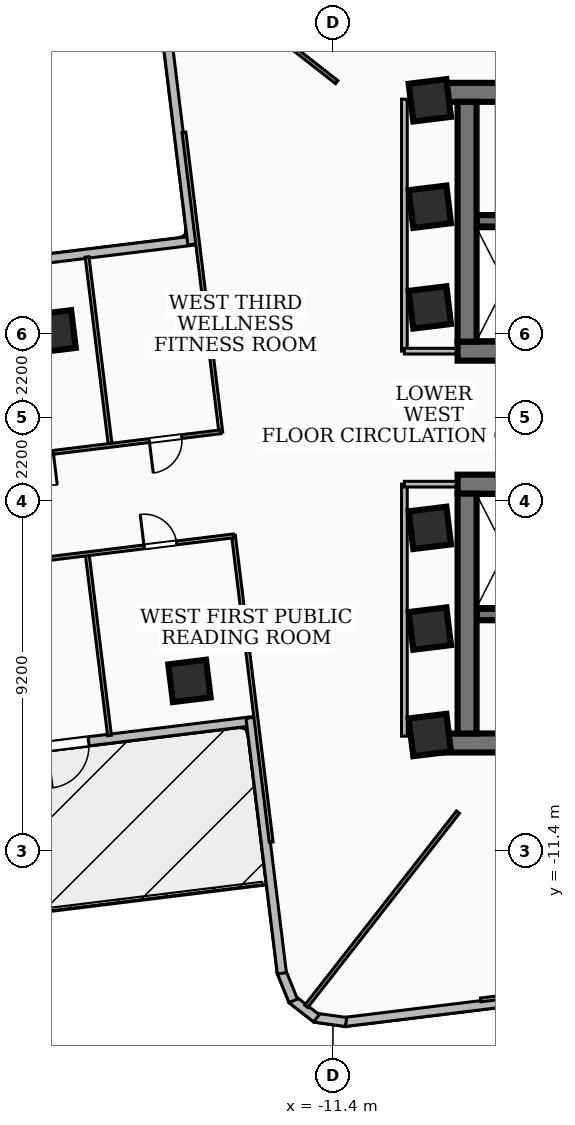
"""IFC4 building model, lengths in metres.
Left out: names, types, materials, properties, quantities, classifications, styles, units other than length and angle.
Written with IfcOpenShell. Run it as: python <this file> out.ifc"""

import sys

from ifc_helpers import new_model, si_unit, direction, frame, frame_2d, origin, origin_2d, place, context, subcontext, project, spatial, rectangle, extrude, element, fill, save


model = new_model("IFC4")
c1 = context("Model", 3, precision=1e-05, world=origin(), true_north=direction((0.0, 1.0)))
c2 = subcontext(c1, "Body", "Model", "MODEL_VIEW")
j1 = project(units=[si_unit("LENGTHUNIT", "METRE"), si_unit("PLANEANGLEUNIT", "RADIAN")], contexts=[c1])
p1 = place(None, origin())
s1 = spatial("IfcSite", under=j1, at=p1, CompositionType="ELEMENT")
p2 = place(p1, origin())
s2 = spatial("IfcBuilding", under=s1, at=p2, CompositionType="ELEMENT")
p3 = place(p2, frame((0.0, 0.0, 82.08)))
s3 = spatial("IfcBuildingStorey", under=s2, at=p3, CompositionType="ELEMENT", Elevation=82.08)
p4 = place(p3, frame((-8.78, 8.56, 0.0), z_axis=(0.0, 0.0, 1.0), x_axis=(1.0, 0.0, 0.0)))
e1 = element("IfcWall", 1, at=p4, inside=s3, PredefinedType="SHEAR", context=c2, shape_type="SweptSolid", body=[
    extrude(rectangle(XDim=17.56, YDim=0.5, at=frame_2d((8.78, 0.0))), origin(), (0.0, 0.0, 1.0), 3.34),
])
p5 = place(p3, frame((8.12, 1.75, 0.0), z_axis=(0.0, 0.0, 1.0), x_axis=(-1.0, 0.0, 0.0)))
e2 = element("IfcWall", 2, at=p5, inside=s3, PredefinedType="SHEAR", context=c2, shape_type="SweptSolid", body=[
    extrude(rectangle(XDim=16.24, YDim=0.5, at=frame_2d((8.12, 0.0))), origin(), (0.0, 0.0, 1.0), 3.34),
])
p6 = place(p5, frame((7.45, 0.0, 0.0)))
e3 = element("IfcOpeningElement", 3, at=p6, cuts=e2, PredefinedType="OPENING", context=c2, shape_type="SweptSolid", body=[
    extrude(rectangle(XDim=1.0, YDim=2.1, at=frame_2d((0.5, 1.05))), frame((0.0, 0.26, 0.0), z_axis=(0.0, -1.0, 0.0), x_axis=(1.0, 0.0, 0.0)), (0.0, 0.0, 1.0), 0.52),
])
p7 = place(p5, frame((3.85, 0.0, 0.0)))
e4 = element("IfcOpeningElement", 4, at=p7, cuts=e2, PredefinedType="OPENING", context=c2, shape_type="SweptSolid", body=[
    extrude(rectangle(XDim=0.9, YDim=2.06, at=frame_2d((0.45, 1.03))), frame((0.0, 0.26, 0.0), z_axis=(0.0, -1.0, 0.0), x_axis=(1.0, 0.0, 0.0)), (0.0, 0.0, 1.0), 0.52),
])
p8 = place(p5, frame((2.35, 0.0, 0.0)))
e5 = element("IfcOpeningElement", 5, at=p8, cuts=e2, PredefinedType="OPENING", context=c2, shape_type="SweptSolid", body=[
    extrude(rectangle(XDim=0.9, YDim=2.06, at=frame_2d((0.45, 1.03))), frame((0.0, 0.26, 0.0), z_axis=(0.0, -1.0, 0.0), x_axis=(1.0, 0.0, 0.0)), (0.0, 0.0, 1.0), 0.52),
])
p9 = place(p5, frame((0.8, 0.0, 0.0)))
e6 = element("IfcOpeningElement", 6, at=p9, cuts=e2, PredefinedType="OPENING", context=c2, shape_type="SweptSolid", body=[
    extrude(rectangle(XDim=0.9, YDim=2.06, at=frame_2d((0.45, 1.03))), frame((0.0, 0.26, 0.0), z_axis=(0.0, -1.0, 0.0), x_axis=(1.0, 0.0, 0.0)), (0.0, 0.0, 1.0), 0.52),
])
p10 = place(p3, frame((-7.87, 2.0, 0.0), z_axis=(0.0, 0.0, 1.0), x_axis=(0.0, 1.0, 0.0)))
e7 = element("IfcWall", 7, at=p10, inside=s3, PredefinedType="SHEAR", context=c2, shape_type="SweptSolid", body=[
    extrude(rectangle(XDim=6.31, YDim=0.5, at=frame_2d((3.155, 0.0))), origin(), (0.0, 0.0, 1.0), 3.34),
])
p11 = place(p3, frame((7.62, 5.18, 0.0), z_axis=(0.0, 0.0, 1.0), x_axis=(-1.0, 0.0, 0.0)))
e8 = element("IfcWall", 8, at=p11, inside=s3, PredefinedType="SOLIDWALL", context=c2, shape_type="SweptSolid", body=[
    extrude(rectangle(XDim=15.24, YDim=0.3, at=frame_2d((7.62, 0.0))), origin(), (0.0, 0.0, 1.0), 3.34),
])
p12 = place(p11, frame((5.77, 0.0, 0.0)))
e9 = element("IfcOpeningElement", 9, at=p12, cuts=e8, PredefinedType="OPENING", context=c2, shape_type="SweptSolid", body=[
    extrude(rectangle(XDim=1.1, YDim=2.15, at=frame_2d((0.55, 1.075))), frame((0.0, 0.16, 0.0), z_axis=(0.0, -1.0, 0.0), x_axis=(1.0, 0.0, 0.0)), (0.0, 0.0, 1.0), 0.32),
])
p13 = place(p11, frame((2.97, 0.0, 0.0)))
e10 = element("IfcOpeningElement", 10, at=p13, cuts=e8, PredefinedType="OPENING", context=c2, shape_type="SweptSolid", body=[
    extrude(rectangle(XDim=1.1, YDim=2.15, at=frame_2d((0.55, 1.075))), frame((0.0, 0.16, 0.0), z_axis=(0.0, -1.0, 0.0), x_axis=(1.0, 0.0, 0.0)), (0.0, 0.0, 1.0), 0.32),
])
p14 = place(p11, frame((7.97, 0.0, 0.0)))
e11 = element("IfcOpeningElement", 11, at=p14, cuts=e8, PredefinedType="OPENING", context=c2, shape_type="SweptSolid", body=[
    extrude(rectangle(XDim=1.0, YDim=2.1, at=frame_2d((0.5, 1.05))), frame((0.0, 0.16, 0.0), z_axis=(0.0, -1.0, 0.0), x_axis=(1.0, 0.0, 0.0)), (0.0, 0.0, 1.0), 0.32),
])
p15 = place(p3, frame((8.78, -8.56, 0.0), z_axis=(0.0, 0.0, 1.0), x_axis=(-1.0, 0.0, 0.0)))
e12 = element("IfcWall", 12, at=p15, inside=s3, PredefinedType="SHEAR", context=c2, shape_type="SweptSolid", body=[
    extrude(rectangle(XDim=17.56, YDim=0.5, at=frame_2d((8.78, 0.0))), origin(), (0.0, 0.0, 1.0), 3.34),
])
p16 = place(p3, frame((-8.12, -1.75, 0.0), z_axis=(0.0, 0.0, 1.0), x_axis=(1.0, 0.0, 0.0)))
e13 = element("IfcWall", 13, at=p16, inside=s3, PredefinedType="SHEAR", context=c2, shape_type="SweptSolid", body=[
    extrude(rectangle(XDim=16.24, YDim=0.5, at=frame_2d((8.12, 0.0))), origin(), (0.0, 0.0, 1.0), 3.34),
])
p17 = place(p16, frame((7.45, 0.0, 0.0)))
e14 = element("IfcOpeningElement", 14, at=p17, cuts=e13, PredefinedType="OPENING", context=c2, shape_type="SweptSolid", body=[
    extrude(rectangle(XDim=1.0, YDim=2.1, at=frame_2d((0.5, 1.05))), frame((0.0, 0.26, 0.0), z_axis=(0.0, -1.0, 0.0), x_axis=(1.0, 0.0, 0.0)), (0.0, 0.0, 1.0), 0.52),
])
p18 = place(p16, frame((10.965, 0.0, 0.0)))
e15 = element("IfcOpeningElement", 15, at=p18, cuts=e13, PredefinedType="OPENING", context=c2, shape_type="SweptSolid", body=[
    extrude(rectangle(XDim=1.05, YDim=2.15, at=frame_2d((0.525, 1.075))), frame((0.0, 0.26, 0.0), z_axis=(0.0, -1.0, 0.0), x_axis=(1.0, 0.0, 0.0)), (0.0, 0.0, 1.0), 0.52),
])
p19 = place(p16, frame((12.525, 0.0, 0.0)))
e16 = element("IfcOpeningElement", 16, at=p19, cuts=e13, PredefinedType="OPENING", context=c2, shape_type="SweptSolid", body=[
    extrude(rectangle(XDim=1.05, YDim=2.15, at=frame_2d((0.525, 1.075))), frame((0.0, 0.26, 0.0), z_axis=(0.0, -1.0, 0.0), x_axis=(1.0, 0.0, 0.0)), (0.0, 0.0, 1.0), 0.52),
])
p20 = place(p16, frame((14.085, 0.0, 0.0)))
e17 = element("IfcOpeningElement", 17, at=p20, cuts=e13, PredefinedType="OPENING", context=c2, shape_type="SweptSolid", body=[
    extrude(rectangle(XDim=1.05, YDim=2.15, at=frame_2d((0.525, 1.075))), frame((0.0, 0.26, 0.0), z_axis=(0.0, -1.0, 0.0), x_axis=(1.0, 0.0, 0.0)), (0.0, 0.0, 1.0), 0.52),
])
p21 = place(p3, frame((-7.87, -8.31, 0.0), z_axis=(0.0, 0.0, 1.0), x_axis=(0.0, 1.0, 0.0)))
e18 = element("IfcWall", 18, at=p21, inside=s3, PredefinedType="SHEAR", context=c2, shape_type="SweptSolid", body=[
    extrude(rectangle(XDim=6.31, YDim=0.5, at=frame_2d((3.155, 0.0))), origin(), (0.0, 0.0, 1.0), 3.34),
])
p22 = place(p3, frame((-7.62, -5.18, 0.0), z_axis=(0.0, 0.0, 1.0), x_axis=(1.0, 0.0, 0.0)))
e19 = element("IfcWall", 19, at=p22, inside=s3, PredefinedType="SOLIDWALL", context=c2, shape_type="SweptSolid", body=[
    extrude(rectangle(XDim=15.24, YDim=0.3, at=frame_2d((7.62, 0.0))), origin(), (0.0, 0.0, 1.0), 3.34),
])
p23 = place(p22, frame((5.77, 0.0, 0.0)))
e20 = element("IfcOpeningElement", 20, at=p23, cuts=e19, PredefinedType="OPENING", context=c2, shape_type="SweptSolid", body=[
    extrude(rectangle(XDim=1.1, YDim=2.15, at=frame_2d((0.55, 1.075))), frame((0.0, 0.16, 0.0), z_axis=(0.0, -1.0, 0.0), x_axis=(1.0, 0.0, 0.0)), (0.0, 0.0, 1.0), 0.32),
])
p24 = place(p22, frame((7.97, 0.0, 0.0)))
e21 = element("IfcOpeningElement", 21, at=p24, cuts=e19, PredefinedType="OPENING", context=c2, shape_type="SweptSolid", body=[
    extrude(rectangle(XDim=1.0, YDim=2.1, at=frame_2d((0.5, 1.05))), frame((0.0, 0.16, 0.0), z_axis=(0.0, -1.0, 0.0), x_axis=(1.0, 0.0, 0.0)), (0.0, 0.0, 1.0), 0.32),
])
for number, where, z_axis, x_axis in (
    (22, (-8.85, -5.55, 0.0), (0.0, 0.0, 1.0), (0.993, 0.122, 0.0)),
    (23, (-8.85, -2.9, 0.0), (0.0, 0.0, 1.0), (0.993, 0.122, 0.0)),
    (24, (-8.85, 2.9, 0.0), (0.0, 0.0, 1.0), (0.993, 0.122, 0.0)),
    (25, (-8.85, 5.55, 0.0), (0.0, 0.0, 1.0), (0.993, 0.122, 0.0)),
    (26, (-8.85, 8.35, 0.0), (0.0, 0.0, 1.0), (0.993, 0.122, 0.0)),
    (27, (-8.85, -8.35, 0.0), (0.0, 0.0, 1.0), (0.993, 0.122, 0.0)),
    (28, (-18.724, 2.271, 0.0), (0.0, 0.0, 1.0), (0.993, 0.122, 0.0)),
    (29, (-15.175, -6.927, 0.0), (0.0, 0.0, 1.0), (0.993, 0.122, 0.0)),
):
    element("IfcColumn", number, at=place(p3, frame(where, z_axis=z_axis, x_axis=x_axis)), inside=s3, PredefinedType="COLUMN", context=c2, shape_type="SweptSolid", body=[
        extrude(rectangle(XDim=1.0, YDim=1.0, at=origin_2d()), origin(), (0.0, 0.0, 1.0), 3.6),
    ])
p25 = place(p3, frame((-13.462, -7.98, 0.0), z_axis=(0.0, 0.0, 1.0), x_axis=(-0.992550299081, -0.121835560463, 0.0)))
e30 = element("IfcWall", 30, at=p25, inside=s3, PredefinedType="SOLIDWALL", context=c2, shape_type="SweptSolid", body=[
    extrude(rectangle(XDim=16.275, YDim=0.24, at=frame_2d((8.138, 0.0))), origin(), (0.0, 0.0, 1.0), 3.34),
])
p26 = place(p25, frame((4.4, 0.0, 0.0)))
e31 = element("IfcOpeningElement", 31, at=p26, cuts=e30, PredefinedType="OPENING", context=c2, shape_type="SweptSolid", body=[
    extrude(rectangle(XDim=1.1, YDim=2.1, at=frame_2d((0.55, 1.05))), frame((0.0, 0.13, 0.0), z_axis=(0.0, -1.0, 0.0), x_axis=(1.0, 0.0, 0.0)), (0.0, 0.0, 1.0), 0.26),
])
p27 = place(p3, frame((-31.169, 2.682, 0.0), z_axis=(0.0, 0.0, 1.0), x_axis=(0.992548484973, 0.121850338438, 0.0)))
e32 = element("IfcWall", 32, at=p27, inside=s3, PredefinedType="SOLIDWALL", context=c2, shape_type="SweptSolid", body=[
    extrude(rectangle(XDim=16.275, YDim=0.24, at=frame_2d((8.138, 0.0))), origin(), (0.0, 0.0, 1.0), 3.34),
])
p28 = place(p27, frame((1.1, 0.0, 0.85)))
e33 = element("IfcOpeningElement", 33, at=p28, cuts=e32, PredefinedType="OPENING", context=c2, shape_type="SweptSolid", body=[
    extrude(rectangle(XDim=2.1, YDim=2.0, at=frame_2d((1.05, 1.0))), frame((0.0, 0.13, 0.0), z_axis=(0.0, -1.0, 0.0), x_axis=(1.0, 0.0, 0.0)), (0.0, 0.0, 1.0), 0.26),
])
p29 = place(p3, frame((-15.098, 4.558, 0.0), z_axis=(0.0, 0.0, 1.0), x_axis=(-0.121938646341, 0.992537639855, 0.0)))
e34 = element("IfcWall", 34, at=p29, inside=s3, PredefinedType="SOLIDWALL", context=c2, shape_type="SweptSolid", body=[
    extrude(rectangle(XDim=6.595, YDim=0.24, at=frame_2d((3.298, 0.0))), origin(), (0.0, 0.0, 1.0), 3.34),
])
p30 = place(p3, frame((-4.558, -15.098, 0.0), z_axis=(0.0, 0.0, 1.0), x_axis=(-0.992537639855, -0.121938646341, 0.0)))
e35 = element("IfcWall", 35, at=p30, inside=s3, PredefinedType="SOLIDWALL", context=c2, shape_type="SweptSolid", body=[
    extrude(rectangle(XDim=6.595, YDim=0.24, at=frame_2d((3.298, 0.0))), origin(), (0.0, 0.0, 1.0), 2.486),
])
p31 = place(p3, frame((-11.054, -15.902, 0.0), z_axis=(0.0, 0.0, 1.0), x_axis=(-0.990379629694, 0.138376981782, 0.0)))
e36 = element("IfcWall", 36, at=p31, inside=s3, PredefinedType="SOLIDWALL", context=c2, shape_type="SweptSolid", body=[
    extrude(rectangle(XDim=0.831, YDim=0.24, at=frame_2d((0.416, 0.0))), origin(), (0.0, 0.0, 1.0), 3.34),
])
p32 = place(p3, frame((-11.832, -15.805, 0.0), z_axis=(0.0, 0.0, 1.0), x_axis=(-0.788996702001, 0.614397431824, 0.0)))
e37 = element("IfcWall", 37, at=p32, inside=s3, PredefinedType="SOLIDWALL", context=c2, shape_type="SweptSolid", body=[
    extrude(rectangle(XDim=0.814, YDim=0.24, at=frame_2d((0.407, 0.0))), origin(), (0.0, 0.0, 1.0), 3.34),
])
p33 = place(p3, frame((-12.445, -15.343, 0.0), z_axis=(0.0, 0.0, 1.0), x_axis=(-0.37326634174, 0.927724225254, 0.0)))
e38 = element("IfcWall", 38, at=p33, inside=s3, PredefinedType="SOLIDWALL", context=c2, shape_type="SweptSolid", body=[
    extrude(rectangle(XDim=0.83, YDim=0.24, at=frame_2d((0.415, 0.0))), origin(), (0.0, 0.0, 1.0), 3.34),
])
p34 = place(p3, frame((-12.743, -14.621, 0.0), z_axis=(0.0, 0.0, 1.0), x_axis=(-0.121949848087, 0.992536263595, 0.0)))
e39 = element("IfcWall", 39, at=p34, inside=s3, PredefinedType="SOLIDWALL", context=c2, shape_type="SweptSolid", body=[
    extrude(rectangle(XDim=6.775, YDim=0.24, at=frame_2d((3.387, 0.0))), origin(), (0.0, 0.0, 1.0), 3.34),
])
p35 = place(p3, frame((-9.52, 1.75, 0.0), z_axis=(0.0, 0.0, 1.0), x_axis=(0.0, 1.0, 0.0)))
e40 = element("IfcWall", 40, at=p35, inside=s3, PredefinedType="PARTITIONING", context=c2, shape_type="SweptSolid", body=[
    extrude(rectangle(XDim=6.63, YDim=0.15, at=frame_2d((3.315, 0.0))), origin(), (0.0, 0.0, 1.0), 2.486),
])
p36 = place(p3, frame((-7.85, 1.75, 0.0), z_axis=(0.0, 0.0, 1.0), x_axis=(-1.0, 0.0, 0.0)))
e41 = element("IfcWall", 41, at=p36, inside=s3, PredefinedType="PARTITIONING", context=c2, shape_type="SweptSolid", body=[
    extrude(rectangle(XDim=1.67, YDim=0.15, at=frame_2d((0.835, 0.0))), origin(), (0.0, 0.0, 1.0), 2.405),
])
p37 = place(p3, frame((-9.52, -8.38, 0.0), z_axis=(0.0, 0.0, 1.0), x_axis=(0.0, 1.0, 0.0)))
e42 = element("IfcWall", 42, at=p37, inside=s3, PredefinedType="PARTITIONING", context=c2, shape_type="SweptSolid", body=[
    extrude(rectangle(XDim=6.63, YDim=0.15, at=frame_2d((3.315, 0.0))), origin(), (0.0, 0.0, 1.0), 2.486),
])
p38 = place(p3, frame((-7.85, -1.75, 0.0), z_axis=(0.0, 0.0, 1.0), x_axis=(-1.0, 0.0, 0.0)))
e43 = element("IfcWall", 43, at=p38, inside=s3, PredefinedType="PARTITIONING", context=c2, shape_type="SweptSolid", body=[
    extrude(rectangle(XDim=1.67, YDim=0.15, at=frame_2d((0.835, 0.0))), origin(), (0.0, 0.0, 1.0), 2.405),
])
p39 = place(p3, frame((-11.3, 8.829, 0.0), z_axis=(0.0, 0.0, 1.0), x_axis=(-0.788014623364, 0.61565652223, 0.0)))
e44 = element("IfcWall", 44, at=p39, inside=s3, PredefinedType="PARTITIONING", context=c2, shape_type="SweptSolid", body=[
    extrude(rectangle(XDim=5.315, YDim=0.1, at=frame_2d((2.657, 0.0))), origin(), (0.0, 0.0, 1.0), 3.34),
])
p40 = place(p3, frame((-8.11, -10.38, 0.0), z_axis=(0.0, 0.0, 1.0), x_axis=(-0.615665236773, -0.788007814828, 0.0)))
e45 = element("IfcWall", 45, at=p40, inside=s3, PredefinedType="PARTITIONING", context=c2, shape_type="SweptSolid", body=[
    extrude(rectangle(XDim=6.482, YDim=0.1, at=frame_2d((3.241, 0.0))), origin(), (0.0, 0.0, 1.0), 3.34),
])
p41 = place(p3, frame((-14.017, -3.101, 0.0), z_axis=(0.0, 0.0, 1.0), x_axis=(0.122045971517, -0.992524448483, 0.0)))
e46 = element("IfcWall", 46, at=p41, inside=s3, PredefinedType="PARTITIONING", context=c2, shape_type="SweptSolid", body=[
    extrude(rectangle(XDim=8.13, YDim=0.1, at=frame_2d((4.065, 0.0))), origin(), (0.0, 0.0, 1.0), 2.486),
])
p42 = place(p3, frame((-15.32, 7.509, 0.0), z_axis=(0.0, 0.0, 1.0), x_axis=(0.122001160868, -0.992529957607, 0.0)))
e47 = element("IfcWall", 47, at=p42, inside=s3, PredefinedType="PARTITIONING", context=c2, shape_type="SweptSolid", body=[
    extrude(rectangle(XDim=7.95, YDim=0.1, at=frame_2d((3.975, 0.0))), origin(), (0.0, 0.0, 1.0), 2.486),
])
p43 = place(p3, frame((-17.864, -3.604, 0.0), z_axis=(0.0, 0.0, 1.0), x_axis=(0.121997782455, -0.992530372873, 0.0)))
e48 = element("IfcWall", 48, at=p43, inside=s3, PredefinedType="PARTITIONING", context=c2, shape_type="SweptSolid", body=[
    extrude(rectangle(XDim=4.795, YDim=0.1, at=frame_2d((2.397, 0.0))), origin(), (0.0, 0.0, 1.0), 2.486),
])
p44 = place(p3, frame((-17.869, 4.229, 0.0), z_axis=(0.0, 0.0, 1.0), x_axis=(0.121993075508, -0.992530951421, 0.0)))
e49 = element("IfcWall", 49, at=p44, inside=s3, PredefinedType="PARTITIONING", context=c2, shape_type="SweptSolid", body=[
    extrude(rectangle(XDim=4.975, YDim=0.1, at=frame_2d((2.488, 0.0))), origin(), (0.0, 0.0, 1.0), 2.486),
])
p45 = place(p3, frame((-20.775, -3.941, 0.0), z_axis=(0.0, 0.0, 1.0), x_axis=(0.992549540745, 0.121841738199, 0.0)))
e50 = element("IfcWall", 50, at=p45, inside=s3, PredefinedType="PARTITIONING", context=c2, shape_type="SweptSolid", body=[
    extrude(rectangle(XDim=6.811, YDim=0.1, at=frame_2d((3.405, 0.0))), origin(), (0.0, 0.0, 1.0), 3.34),
])
p46 = place(p45, frame((4.441, 0.0, 0.0)))
e51 = element("IfcOpeningElement", 51, at=p46, cuts=e50, PredefinedType="OPENING", context=c2, shape_type="SweptSolid", body=[
    extrude(rectangle(XDim=0.86, YDim=2.04, at=frame_2d((0.43, 1.02))), frame((0.0, 0.06, 0.0), z_axis=(0.0, -1.0, 0.0), x_axis=(1.0, 0.0, 0.0)), (0.0, 0.0, 1.0), 0.12),
])
p47 = place(p45, frame((1.036, 0.0, 0.0)))
e52 = element("IfcOpeningElement", 52, at=p47, cuts=e50, PredefinedType="OPENING", context=c2, shape_type="SweptSolid", body=[
    extrude(rectangle(XDim=0.86, YDim=2.04, at=frame_2d((0.43, 1.02))), frame((0.0, 0.06, 0.0), z_axis=(0.0, -1.0, 0.0), x_axis=(1.0, 0.0, 0.0)), (0.0, 0.0, 1.0), 0.12),
])
p48 = place(p3, frame((-14.352, -0.372, 0.0), z_axis=(0.0, 0.0, 1.0), x_axis=(-0.992547411675, -0.121859080812, 0.0)))
e53 = element("IfcWall", 53, at=p48, inside=s3, PredefinedType="PARTITIONING", context=c2, shape_type="SweptSolid", body=[
    extrude(rectangle(XDim=6.81, YDim=0.1, at=frame_2d((3.405, 0.0))), origin(), (0.0, 0.0, 1.0), 3.34),
])
p49 = place(p48, frame((1.035, 0.0, 0.0)))
e54 = element("IfcOpeningElement", 54, at=p49, cuts=e53, PredefinedType="OPENING", context=c2, shape_type="SweptSolid", body=[
    extrude(rectangle(XDim=0.86, YDim=2.04, at=frame_2d((0.43, 1.02))), frame((0.0, 0.06, 0.0), z_axis=(0.0, -1.0, 0.0), x_axis=(1.0, 0.0, 0.0)), (0.0, 0.0, 1.0), 0.12),
])
p50 = place(p48, frame((4.44, 0.0, 0.0)))
e55 = element("IfcOpeningElement", 55, at=p50, cuts=e53, PredefinedType="OPENING", context=c2, shape_type="SweptSolid", body=[
    extrude(rectangle(XDim=0.86, YDim=2.04, at=frame_2d((0.43, 1.02))), frame((0.0, 0.06, 0.0), z_axis=(0.0, -1.0, 0.0), x_axis=(1.0, 0.0, 0.0)), (0.0, 0.0, 1.0), 0.12),
])
p51 = place(p3, frame((-7.509, -15.32, 0.0), z_axis=(0.0, 0.0, 1.0), x_axis=(0.992529957607, 0.122001160868, 0.0)))
e56 = element("IfcWall", 56, at=p51, inside=s3, PredefinedType="PARTITIONING", context=c2, shape_type="SweptSolid", body=[
    extrude(rectangle(XDim=7.95, YDim=0.1, at=frame_2d((3.975, 0.0))), origin(), (0.0, 0.0, 1.0), 2.486),
])
p52 = place(p26, origin())
e57 = element("IfcDoor", 57, at=p52, inside=s3, OperationType="SINGLE_SWING_RIGHT", PredefinedType="DOOR", context=c2, shape_type="SweptSolid", body=[
    extrude(rectangle(XDim=1.1, YDim=2.1, at=frame_2d((0.55, 1.05))), frame((0.0, 0.025, 0.0), z_axis=(0.0, -1.0, 0.0), x_axis=(1.0, 0.0, 0.0)), (0.0, 0.0, 1.0), 0.05),
])
fill(e31, e57)
p53 = place(p46, origin())
e58 = element("IfcDoor", 58, at=p53, inside=s3, OperationType="SINGLE_SWING_LEFT", PredefinedType="DOOR", context=c2, shape_type="SweptSolid", body=[
    extrude(rectangle(XDim=0.86, YDim=2.04, at=frame_2d((0.43, 1.02))), frame((0.0, 0.025, 0.0), z_axis=(0.0, -1.0, 0.0), x_axis=(1.0, 0.0, 0.0)), (0.0, 0.0, 1.0), 0.05),
])
fill(e51, e58)
p54 = place(p49, origin())
e59 = element("IfcDoor", 59, at=p54, inside=s3, OperationType="SINGLE_SWING_RIGHT", PredefinedType="DOOR", context=c2, shape_type="SweptSolid", body=[
    extrude(rectangle(XDim=0.86, YDim=2.04, at=frame_2d((0.43, 1.02))), frame((0.0, 0.025, 0.0), z_axis=(0.0, -1.0, 0.0), x_axis=(1.0, 0.0, 0.0)), (0.0, 0.0, 1.0), 0.05),
])
fill(e54, e59)
p55 = place(p50, origin())
e60 = element("IfcDoor", 60, at=p55, inside=s3, OperationType="SINGLE_SWING_LEFT", PredefinedType="DOOR", context=c2, shape_type="SweptSolid", body=[
    extrude(rectangle(XDim=0.86, YDim=2.04, at=frame_2d((0.43, 1.02))), frame((0.0, 0.025, 0.0), z_axis=(0.0, -1.0, 0.0), x_axis=(1.0, 0.0, 0.0)), (0.0, 0.0, 1.0), 0.05),
])
fill(e55, e60)
save(model, sys.argv[1])
